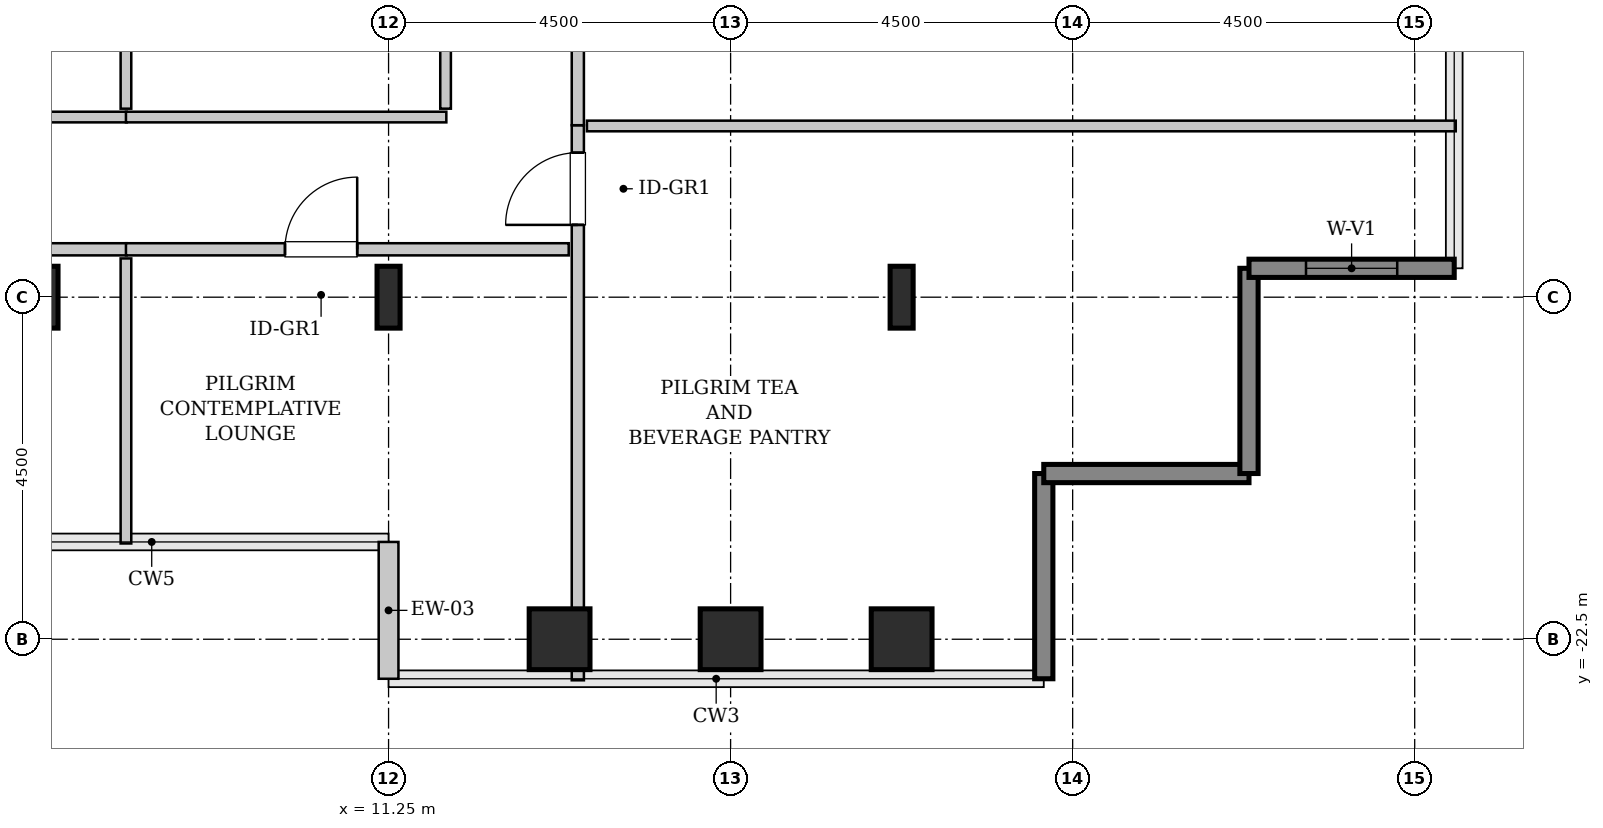
"""IFC4 building model, lengths in metres.
Left out: names, types, materials, properties, quantities, classifications, styles, units other than length and angle.
Written with IfcOpenShell. Run it as: python <this file> out.ifc"""

import sys

from ifc_helpers import new_model, si_unit, direction, frame, frame_2d, origin, origin_2d, place, context, subcontext, project, spatial, rectangle, hollow_rectangle, i_section, extrude, source, transform, mapped, element, fill, save


model = new_model("IFC4")
c1 = context("Model", 3, precision=1e-05, world=origin(), true_north=direction((0.0, 1.0)))
c2 = subcontext(c1, "Body", "Model", "MODEL_VIEW")
j1 = project(units=[si_unit("LENGTHUNIT", "METRE"), si_unit("PLANEANGLEUNIT", "RADIAN")], contexts=[c1])
p1 = place(None, origin())
s1 = spatial("IfcSite", under=j1, at=p1, CompositionType="ELEMENT")
p2 = place(p1, origin())
s2 = spatial("IfcBuilding", under=s1, at=p2, CompositionType="ELEMENT")
p3 = place(p2, frame((0.0, 0.0, 175.4)))
s3 = spatial("IfcBuildingStorey", under=s2, at=p3, CompositionType="ELEMENT", Elevation=175.4)
m1 = source(origin(), c2, "Body", "SweptSolid", [
    extrude(i_section(OverallWidth=0.303, OverallDepth=0.814, WebThickness=0.021, FlangeThickness=0.04, FilletRadius=0.03, at=origin_2d()), origin(), (0.0, 0.0, 1.0), 3.8),
])
for number, where, z_axis, x_axis in (
    (1, (6.75, -18.0, 0.0), (0.0, 0.0, 1.0), (1.0, 0.0, 0.0)),
    (2, (11.25, -18.0, 0.0), (0.0, 0.0, 1.0), (1.0, 0.0, 0.0)),
):
    element("IfcColumn", number, at=place(p3, frame(where, z_axis=z_axis, x_axis=x_axis)), inside=s3, PredefinedType="COLUMN", context=c2, shape_type="MappedRepresentation", body=[
        mapped(m1, transform((0.0, 0.0, 0.0), x_axis=(1.0, 0.0, 0.0), y_axis=(0.0, 1.0, 0.0), z_axis=(0.0, 0.0, 1.0), scale=1.0)),
    ])
m2 = source(origin(), c2, "Body", "SweptSolid", [
    extrude(hollow_rectangle(XDim=0.8, YDim=0.8, WallThickness=0.04, InnerFilletRadius=0.04, OuterFilletRadius=0.08, at=origin_2d()), origin(), (0.0, 0.0, 1.0), 3.8),
])
for number, where, z_axis, x_axis in (
    (3, (13.5, -22.5, 0.0), (0.0, 0.0, 1.0), (1.0, 0.0, 0.0)),
    (4, (15.75, -22.5, 0.0), (0.0, 0.0, 1.0), (1.0, 0.0, 0.0)),
    (5, (18.0, -22.5, 0.0), (0.0, 0.0, 1.0), (1.0, 0.0, 0.0)),
):
    element("IfcColumn", number, at=place(p3, frame(where, z_axis=z_axis, x_axis=x_axis)), inside=s3, PredefinedType="COLUMN", context=c2, shape_type="MappedRepresentation", body=[
        mapped(m2, transform((0.0, 0.0, 0.0), x_axis=(1.0, 0.0, 0.0), y_axis=(0.0, 1.0, 0.0), z_axis=(0.0, 0.0, 1.0), scale=1.0)),
    ])
p4 = place(p3, frame((18.0, -18.0, 0.0), z_axis=(0.0, 0.0, 1.0), x_axis=(1.0, 0.0, 0.0)))
e6 = element("IfcColumn", 6, at=p4, inside=s3, PredefinedType="COLUMN", context=c2, shape_type="MappedRepresentation", body=[
    mapped(m1, transform((0.0, 0.0, 0.0), x_axis=(1.0, 0.0, 0.0), y_axis=(0.0, 1.0, 0.0), z_axis=(0.0, 0.0, 1.0), scale=1.0)),
])
m3 = source(origin(), c2, "Body", "SweptSolid", [
    extrude(rectangle(XDim=1.8, YDim=0.26, at=frame_2d((0.9, 0.0))), origin(), (0.0, 0.0, 1.0), 3.55),
])
p5 = place(p3, frame((11.25, -21.22, 0.0), z_axis=(0.0, 0.0, 1.0), x_axis=(0.0, -1.0, 0.0)))
e7 = element("IfcWall", 7, at=p5, inside=s3, PredefinedType="SOLIDWALL", context=c2, shape_type="MappedRepresentation", body=[
    mapped(m3, transform((0.0, 0.0, 0.0), x_axis=(1.0, 0.0, 0.0), y_axis=(0.0, 1.0, 0.0), z_axis=(0.0, 0.0, 1.0), scale=1.0)),
])
m4 = source(origin(), c2, "Body", "SweptSolid", [
    extrude(rectangle(XDim=2.7, YDim=0.24, at=frame_2d((1.35, 0.0))), origin(), (0.0, 0.0, 1.0), 3.55),
])
for number, where, z_axis, x_axis in (
    (8, (19.87, -23.02, 0.0), (0.0, 0.0, 1.0), (0.0, 1.0, 0.0)),
    (9, (19.87, -20.32, 0.0), (0.0, 0.0, 1.0), (1.0, 0.0, 0.0)),
    (10, (22.57, -20.32, 0.0), (0.0, 0.0, 1.0), (0.0, 1.0, 0.0)),
):
    element("IfcWall", number, at=place(p3, frame(where, z_axis=z_axis, x_axis=x_axis)), inside=s3, PredefinedType="SHEAR", context=c2, shape_type="MappedRepresentation", body=[
        mapped(m4, transform((0.0, 0.0, 0.0), x_axis=(1.0, 0.0, 0.0), y_axis=(0.0, 1.0, 0.0), z_axis=(0.0, 0.0, 1.0), scale=1.0)),
    ])
p6 = place(p3, frame((22.57, -17.62, 0.0), z_axis=(0.0, 0.0, 1.0), x_axis=(1.0, 0.0, 0.0)))
e11 = element("IfcWall", 11, at=p6, inside=s3, PredefinedType="SHEAR", context=c2, shape_type="MappedRepresentation", body=[
    mapped(m4, transform((0.0, 0.0, 0.0), x_axis=(1.0, 0.0, 0.0), y_axis=(0.0, 1.0, 0.0), z_axis=(0.0, 0.0, 1.0), scale=1.0)),
])
p7 = place(p6, frame((0.75, 0.0, 0.85)))
e12 = element("IfcOpeningElement", 12, at=p7, cuts=e11, PredefinedType="OPENING", context=c2, shape_type="SweptSolid", body=[
    extrude(rectangle(XDim=1.2, YDim=1.8, at=frame_2d((0.6, 0.9))), frame((0.0, 0.13, 0.0), z_axis=(0.0, -1.0, 0.0), x_axis=(1.0, 0.0, 0.0)), (0.0, 0.0, 1.0), 0.26),
])
m5 = source(origin(), c2, "Body", "SweptSolid", [
    extrude(rectangle(XDim=7.302, YDim=0.16, at=frame_2d((3.651, 0.0))), origin(), (0.0, 0.0, 1.0), 3.535),
])
p8 = place(p3, frame((13.74, -23.04, 0.0), z_axis=(0.0, 0.0, 1.0), x_axis=(0.0, 1.0, 0.0)))
e13 = element("IfcWall", 13, at=p8, inside=s3, PredefinedType="PARTITIONING", context=c2, shape_type="MappedRepresentation", body=[
    mapped(m5, transform((0.0, 0.0, 0.0), x_axis=(1.0, 0.0, 0.0), y_axis=(0.0, 1.0, 0.0), z_axis=(0.0, 0.0, 1.0), scale=1.0)),
])
p9 = place(p8, frame((5.991, 0.0, 0.0)))
e14 = element("IfcOpeningElement", 14, at=p9, cuts=e13, PredefinedType="OPENING", context=c2, shape_type="SweptSolid", body=[
    extrude(rectangle(XDim=0.95, YDim=2.1, at=frame_2d((0.475, 1.05))), frame((0.0, 0.09, 0.0), z_axis=(0.0, -1.0, 0.0), x_axis=(1.0, 0.0, 0.0)), (0.0, 0.0, 1.0), 0.18),
])
m6 = source(origin(), c2, "Body", "SweptSolid", [
    extrude(rectangle(XDim=11.43, YDim=0.14, at=frame_2d((5.715, 0.0))), origin(), (0.0, 0.0, 1.0), 3.535),
])
p10 = place(p3, frame((13.86, -15.748, 0.0), z_axis=(0.0, 0.0, 1.0), x_axis=(1.0, 0.0, 0.0)))
e15 = element("IfcWall", 15, at=p10, inside=s3, PredefinedType="PARTITIONING", context=c2, shape_type="MappedRepresentation", body=[
    mapped(m6, transform((0.0, 0.0, 0.0), x_axis=(1.0, 0.0, 0.0), y_axis=(0.0, 1.0, 0.0), z_axis=(0.0, 0.0, 1.0), scale=1.0)),
])
m7 = source(origin(), c2, "Body", "SweptSolid", [
    extrude(rectangle(XDim=7.242, YDim=0.16, at=frame_2d((3.621, 0.0))), origin(), (0.0, 0.0, 1.0), 3.535),
])
p11 = place(p3, frame((13.74, -15.738, 0.0), z_axis=(0.0, 0.0, 1.0), x_axis=(0.0, 1.0, 0.0)))
e16 = element("IfcWall", 16, at=p11, inside=s3, PredefinedType="PARTITIONING", context=c2, shape_type="MappedRepresentation", body=[
    mapped(m7, transform((0.0, 0.0, 0.0), x_axis=(1.0, 0.0, 0.0), y_axis=(0.0, 1.0, 0.0), z_axis=(0.0, 0.0, 1.0), scale=1.0)),
])
p12 = place(p11, frame((3.146, 0.0, 0.0)))
e17 = element("IfcOpeningElement", 17, at=p12, cuts=e16, PredefinedType="OPENING", context=c2, shape_type="SweptSolid", body=[
    extrude(rectangle(XDim=0.95, YDim=2.1, at=frame_2d((0.475, 1.05))), frame((0.0, 0.09, 0.0), z_axis=(0.0, -1.0, 0.0), x_axis=(1.0, 0.0, 0.0)), (0.0, 0.0, 1.0), 0.18),
])
m8 = source(origin(), c2, "Body", "SweptSolid", [
    extrude(rectangle(XDim=6.01, YDim=0.16, at=frame_2d((3.005, 0.0))), origin(), (0.0, 0.0, 1.0), 3.535),
])
p13 = place(p3, frame((1.795, -17.37, 0.0), z_axis=(0.0, 0.0, 1.0), x_axis=(1.0, 0.0, 0.0)))
e18 = element("IfcWall", 18, at=p13, inside=s3, PredefinedType="PARTITIONING", context=c2, shape_type="MappedRepresentation", body=[
    mapped(m8, transform((0.0, 0.0, 0.0), x_axis=(1.0, 0.0, 0.0), y_axis=(0.0, 1.0, 0.0), z_axis=(0.0, 0.0, 1.0), scale=1.0)),
])
p14 = place(p13, frame((2.53, 0.0, 0.0)))
e19 = element("IfcOpeningElement", 19, at=p14, cuts=e18, PredefinedType="OPENING", context=c2, shape_type="SweptSolid", body=[
    extrude(rectangle(XDim=0.95, YDim=2.1, at=frame_2d((0.475, 1.05))), frame((0.0, 0.09, 0.0), z_axis=(0.0, -1.0, 0.0), x_axis=(1.0, 0.0, 0.0)), (0.0, 0.0, 1.0), 0.18),
])
m9 = source(origin(), c2, "Body", "SweptSolid", [
    extrude(rectangle(XDim=3.75, YDim=0.14, at=frame_2d((1.875, 0.0))), origin(), (0.0, 0.0, 1.0), 3.535),
])
p15 = place(p3, frame((7.795, -21.24, 0.0), z_axis=(0.0, 0.0, 1.0), x_axis=(0.0, 1.0, 0.0)))
e20 = element("IfcWall", 20, at=p15, inside=s3, PredefinedType="PARTITIONING", context=c2, shape_type="MappedRepresentation", body=[
    mapped(m9, transform((0.0, 0.0, 0.0), x_axis=(1.0, 0.0, 0.0), y_axis=(0.0, 1.0, 0.0), z_axis=(0.0, 0.0, 1.0), scale=1.0)),
])
m10 = source(origin(), c2, "Body", "SweptSolid", [
    extrude(rectangle(XDim=6.01, YDim=0.14, at=frame_2d((3.005, 0.0))), origin(), (0.0, 0.0, 1.0), 3.535),
])
p16 = place(p3, frame((1.795, -15.63, 0.0), z_axis=(0.0, 0.0, 1.0), x_axis=(1.0, 0.0, 0.0)))
e21 = element("IfcWall", 21, at=p16, inside=s3, PredefinedType="PARTITIONING", context=c2, shape_type="MappedRepresentation", body=[
    mapped(m10, transform((0.0, 0.0, 0.0), x_axis=(1.0, 0.0, 0.0), y_axis=(0.0, 1.0, 0.0), z_axis=(0.0, 0.0, 1.0), scale=1.0)),
])
m11 = source(origin(), c2, "Body", "SweptSolid", [
    extrude(rectangle(XDim=3.93, YDim=0.14, at=frame_2d((1.965, 0.0))), origin(), (0.0, 0.0, 1.0), 3.535),
])
p17 = place(p3, frame((7.795, -15.52, 0.0), z_axis=(0.0, 0.0, 1.0), x_axis=(0.0, 1.0, 0.0)))
e22 = element("IfcWall", 22, at=p17, inside=s3, PredefinedType="PARTITIONING", context=c2, shape_type="MappedRepresentation", body=[
    mapped(m11, transform((0.0, 0.0, 0.0), x_axis=(1.0, 0.0, 0.0), y_axis=(0.0, 1.0, 0.0), z_axis=(0.0, 0.0, 1.0), scale=1.0)),
])
m12 = source(origin(), c2, "Body", "SweptSolid", [
    extrude(rectangle(XDim=5.825, YDim=0.16, at=frame_2d((2.913, 0.0))), origin(), (0.0, 0.0, 1.0), 3.535),
])
p18 = place(p3, frame((7.795, -17.37, 0.0), z_axis=(0.0, 0.0, 1.0), x_axis=(1.0, 0.0, 0.0)))
e23 = element("IfcWall", 23, at=p18, inside=s3, PredefinedType="PARTITIONING", context=c2, shape_type="MappedRepresentation", body=[
    mapped(m12, transform((0.0, 0.0, 0.0), x_axis=(1.0, 0.0, 0.0), y_axis=(0.0, 1.0, 0.0), z_axis=(0.0, 0.0, 1.0), scale=1.0)),
])
p19 = place(p18, frame((2.092, 0.0, 0.0)))
e24 = element("IfcOpeningElement", 24, at=p19, cuts=e23, PredefinedType="OPENING", context=c2, shape_type="SweptSolid", body=[
    extrude(rectangle(XDim=0.95, YDim=2.1, at=frame_2d((0.475, 1.05))), frame((0.0, 0.09, 0.0), z_axis=(0.0, -1.0, 0.0), x_axis=(1.0, 0.0, 0.0)), (0.0, 0.0, 1.0), 0.18),
])
m13 = source(origin(), c2, "Body", "SweptSolid", [
    extrude(rectangle(XDim=4.215, YDim=0.14, at=frame_2d((2.107, 0.0))), origin(), (0.0, 0.0, 1.0), 3.535),
])
p20 = place(p3, frame((7.795, -15.63, 0.0), z_axis=(0.0, 0.0, 1.0), x_axis=(1.0, 0.0, 0.0)))
e25 = element("IfcWall", 25, at=p20, inside=s3, PredefinedType="PARTITIONING", context=c2, shape_type="MappedRepresentation", body=[
    mapped(m13, transform((0.0, 0.0, 0.0), x_axis=(1.0, 0.0, 0.0), y_axis=(0.0, 1.0, 0.0), z_axis=(0.0, 0.0, 1.0), scale=1.0)),
])
p21 = place(p3, frame((12.0, -15.52, 0.0), z_axis=(0.0, 0.0, 1.0), x_axis=(0.0, 1.0, 0.0)))
e26 = element("IfcWall", 26, at=p21, inside=s3, PredefinedType="PARTITIONING", context=c2, shape_type="MappedRepresentation", body=[
    mapped(m11, transform((0.0, 0.0, 0.0), x_axis=(1.0, 0.0, 0.0), y_axis=(0.0, 1.0, 0.0), z_axis=(0.0, 0.0, 1.0), scale=1.0)),
])
m14 = source(origin(), c2, "Body", "SweptSolid", [
    extrude(rectangle(XDim=1.2, YDim=1.8, at=frame_2d((0.6, 0.9))), frame((0.0, 0.03, 0.0), z_axis=(0.0, -1.0, 0.0), x_axis=(1.0, 0.0, 0.0)), (0.0, 0.0, 1.0), 0.06),
])
p22 = place(p7, origin())
e27 = element("IfcWindow", 27, at=p22, inside=s3, PartitioningType="SINGLE_PANEL", PredefinedType="WINDOW", context=c2, shape_type="MappedRepresentation", body=[
    mapped(m14, transform((0.0, 0.0, 0.0), x_axis=(1.0, 0.0, 0.0), y_axis=(0.0, 1.0, 0.0), z_axis=(0.0, 0.0, 1.0), scale=1.0)),
])
fill(e12, e27)
m15 = source(origin(), c2, "Body", "SweptSolid", [
    extrude(rectangle(XDim=0.95, YDim=2.1, at=frame_2d((0.475, 1.05))), frame((0.0, 0.025, 0.0), z_axis=(0.0, -1.0, 0.0), x_axis=(1.0, 0.0, 0.0)), (0.0, 0.0, 1.0), 0.05),
])
p23 = place(p9, origin())
e28 = element("IfcDoor", 28, at=p23, inside=s3, OperationType="SINGLE_SWING_LEFT", PredefinedType="DOOR", context=c2, shape_type="MappedRepresentation", body=[
    mapped(m15, transform((0.0, 0.0, 0.0), x_axis=(1.0, 0.0, 0.0), y_axis=(0.0, 1.0, 0.0), z_axis=(0.0, 0.0, 1.0), scale=1.0)),
])
fill(e14, e28)
p24 = place(p19, origin())
e29 = element("IfcDoor", 29, at=p24, inside=s3, OperationType="SINGLE_SWING_RIGHT", PredefinedType="DOOR", context=c2, shape_type="MappedRepresentation", body=[
    mapped(m15, transform((0.0, 0.0, 0.0), x_axis=(1.0, 0.0, 0.0), y_axis=(0.0, 1.0, 0.0), z_axis=(0.0, 0.0, 1.0), scale=1.0)),
])
fill(e24, e29)
save(model, sys.argv[1])
